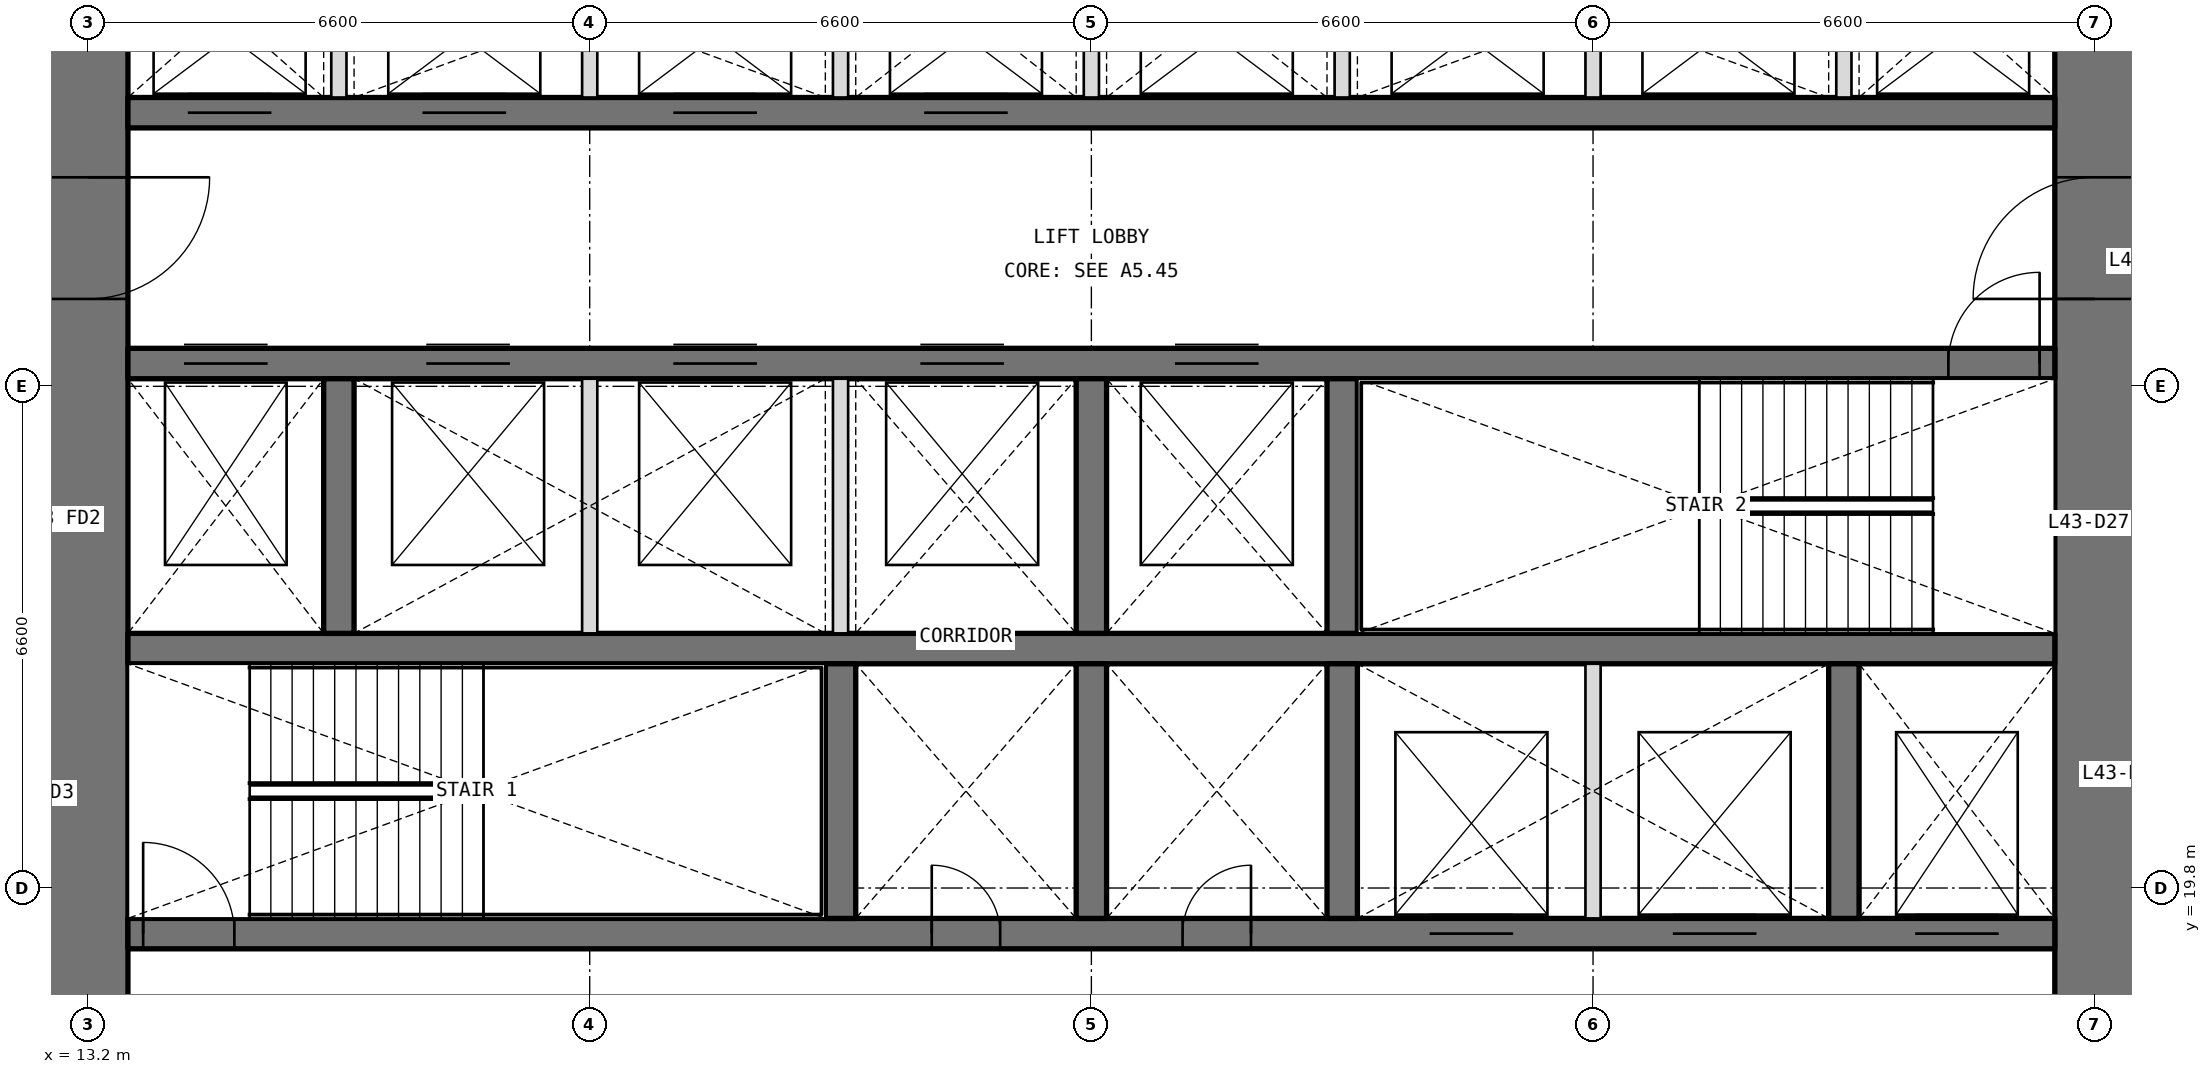
"""IFC4 building model, lengths in metres.
Left out: names, types, materials, properties, quantities, classifications, styles, units other than length and angle.
Written with IfcOpenShell. Run it as: python <this file> out.ifc"""

import sys

from ifc_helpers import new_model, si_unit, direction, frame, frame_2d, origin, place, context, subcontext, project, spatial, rectangle, extrude, element, fill, save


model = new_model("IFC4")
c1 = context("Model", 3, precision=1e-05, world=origin(), true_north=direction((0.0, 1.0)))
c2 = subcontext(c1, "Body", "Model", "MODEL_VIEW")
j1 = project(units=[si_unit("LENGTHUNIT", "METRE"), si_unit("PLANEANGLEUNIT", "RADIAN")], contexts=[c1])
p1 = place(None, origin())
s1 = spatial("IfcSite", under=j1, at=p1, CompositionType="ELEMENT")
p2 = place(p1, origin())
s2 = spatial("IfcBuilding", under=s1, at=p2, CompositionType="ELEMENT")
p3 = place(p2, frame((0.0, 0.0, 189.3)))
s3 = spatial("IfcBuildingStorey", under=s2, at=p3, CompositionType="ELEMENT", Elevation=189.3)
p4 = place(p3, frame((39.6, 13.725, 0.0), z_axis=(0.0, 0.0, 1.0), x_axis=(0.0, 1.0, 0.0)))
e1 = element("IfcWall", 1, at=p4, inside=s3, PredefinedType="SHEAR", context=c2, shape_type="SweptSolid", body=[
    extrude(rectangle(XDim=18.75, YDim=1.05, at=frame_2d((9.375, 0.0))), origin(), (0.0, 0.0, 1.0), 4.2),
])
p5 = place(p4, frame((3.025, 0.0, 0.0)))
e2 = element("IfcOpeningElement", 2, at=p5, cuts=e1, PredefinedType="OPENING", context=c2, shape_type="SweptSolid", body=[
    extrude(rectangle(XDim=1.6, YDim=2.1, at=frame_2d((0.8, 1.05))), frame((0.0, 0.535, 0.0), z_axis=(0.0, -1.0, 0.0), x_axis=(1.0, 0.0, 0.0)), (0.0, 0.0, 1.0), 1.07),
])
p6 = place(p4, frame((13.825, 0.0, 0.0)))
e3 = element("IfcOpeningElement", 3, at=p6, cuts=e1, PredefinedType="OPENING", context=c2, shape_type="SweptSolid", body=[
    extrude(rectangle(XDim=1.6, YDim=2.1, at=frame_2d((0.8, 1.05))), frame((0.0, 0.535, 0.0), z_axis=(0.0, -1.0, 0.0), x_axis=(1.0, 0.0, 0.0)), (0.0, 0.0, 1.0), 1.07),
])
p7 = place(p3, frame((13.2, 32.475, 0.0), z_axis=(0.0, 0.0, 1.0), x_axis=(0.0, -1.0, 0.0)))
e4 = element("IfcWall", 4, at=p7, inside=s3, PredefinedType="SHEAR", context=c2, shape_type="SweptSolid", body=[
    extrude(rectangle(XDim=18.75, YDim=1.05, at=frame_2d((9.375, 0.0))), origin(), (0.0, 0.0, 1.0), 4.2),
])
p8 = place(p7, frame((14.125, 0.0, 0.0)))
e5 = element("IfcOpeningElement", 5, at=p8, cuts=e4, PredefinedType="OPENING", context=c2, shape_type="SweptSolid", body=[
    extrude(rectangle(XDim=1.6, YDim=2.1, at=frame_2d((0.8, 1.05))), frame((0.0, 0.535, 0.0), z_axis=(0.0, -1.0, 0.0), x_axis=(1.0, 0.0, 0.0)), (0.0, 0.0, 1.0), 1.07),
])
p9 = place(p7, frame((3.325, 0.0, 0.0)))
e6 = element("IfcOpeningElement", 6, at=p9, cuts=e4, PredefinedType="OPENING", context=c2, shape_type="SweptSolid", body=[
    extrude(rectangle(XDim=1.6, YDim=2.1, at=frame_2d((0.8, 1.05))), frame((0.0, 0.535, 0.0), z_axis=(0.0, -1.0, 0.0), x_axis=(1.0, 0.0, 0.0)), (0.0, 0.0, 1.0), 1.07),
])
p10 = place(p3, frame((13.725, 19.2, 0.0), z_axis=(0.0, 0.0, 1.0), x_axis=(1.0, 0.0, 0.0)))
e7 = element("IfcWall", 7, at=p10, inside=s3, PredefinedType="SHEAR", context=c2, shape_type="SweptSolid", body=[
    extrude(rectangle(XDim=25.35, YDim=0.4, at=frame_2d((12.675, 0.0))), origin(), (0.0, 0.0, 1.0), 4.2),
])
p11 = place(p10, frame((10.575, 0.0, 0.0)))
e8 = element("IfcOpeningElement", 8, at=p11, cuts=e7, PredefinedType="OPENING", context=c2, shape_type="SweptSolid", body=[
    extrude(rectangle(XDim=0.9, YDim=2.1, at=frame_2d((0.45, 1.05))), frame((0.0, 0.21, 0.0), z_axis=(0.0, -1.0, 0.0), x_axis=(1.0, 0.0, 0.0)), (0.0, 0.0, 1.0), 0.42),
])
p12 = place(p10, frame((13.875, 0.0, 0.0)))
e9 = element("IfcOpeningElement", 9, at=p12, cuts=e7, PredefinedType="OPENING", context=c2, shape_type="SweptSolid", body=[
    extrude(rectangle(XDim=0.9, YDim=2.1, at=frame_2d((0.45, 1.05))), frame((0.0, 0.21, 0.0), z_axis=(0.0, -1.0, 0.0), x_axis=(1.0, 0.0, 0.0)), (0.0, 0.0, 1.0), 0.42),
])
p13 = place(p10, frame((0.2, 0.0, 0.0)))
e10 = element("IfcOpeningElement", 10, at=p13, cuts=e7, PredefinedType="OPENING", context=c2, shape_type="SweptSolid", body=[
    extrude(rectangle(XDim=1.2, YDim=2.1, at=frame_2d((0.6, 1.05))), frame((0.0, 0.21, 0.0), z_axis=(0.0, -1.0, 0.0), x_axis=(1.0, 0.0, 0.0)), (0.0, 0.0, 1.0), 0.42),
])
p14 = place(p10, frame((23.512, 0.0, 0.0)))
e11 = element("IfcOpeningElement", 11, at=p14, cuts=e7, PredefinedType="OPENING", context=c2, shape_type="SweptSolid", body=[
    extrude(rectangle(XDim=1.1, YDim=2.1, at=frame_2d((0.55, 1.05))), frame((0.0, 0.21, 0.0), z_axis=(0.0, -1.0, 0.0), x_axis=(1.0, 0.0, 0.0)), (0.0, 0.0, 1.0), 0.42),
])
p15 = place(p10, frame((17.125, 0.0, 0.0)))
e12 = element("IfcOpeningElement", 12, at=p15, cuts=e7, PredefinedType="OPENING", context=c2, shape_type="SweptSolid", body=[
    extrude(rectangle(XDim=1.1, YDim=2.1, at=frame_2d((0.55, 1.05))), frame((0.0, 0.21, 0.0), z_axis=(0.0, -1.0, 0.0), x_axis=(1.0, 0.0, 0.0)), (0.0, 0.0, 1.0), 0.42),
])
p16 = place(p10, frame((20.325, 0.0, 0.0)))
e13 = element("IfcOpeningElement", 13, at=p16, cuts=e7, PredefinedType="OPENING", context=c2, shape_type="SweptSolid", body=[
    extrude(rectangle(XDim=1.1, YDim=2.1, at=frame_2d((0.55, 1.05))), frame((0.0, 0.21, 0.0), z_axis=(0.0, -1.0, 0.0), x_axis=(1.0, 0.0, 0.0)), (0.0, 0.0, 1.0), 0.42),
])
p17 = place(p3, frame((13.725, 22.95, 0.0), z_axis=(0.0, 0.0, 1.0), x_axis=(1.0, 0.0, 0.0)))
e14 = element("IfcWall", 14, at=p17, inside=s3, PredefinedType="SHEAR", context=c2, shape_type="SweptSolid", body=[
    extrude(rectangle(XDim=25.35, YDim=0.4, at=frame_2d((12.675, 0.0))), origin(), (0.0, 0.0, 1.0), 4.2),
])
p18 = place(p3, frame((13.725, 26.7, 0.0), z_axis=(0.0, 0.0, 1.0), x_axis=(1.0, 0.0, 0.0)))
e15 = element("IfcWall", 15, at=p18, inside=s3, PredefinedType="SHEAR", context=c2, shape_type="SweptSolid", body=[
    extrude(rectangle(XDim=25.35, YDim=0.4, at=frame_2d((12.675, 0.0))), origin(), (0.0, 0.0, 1.0), 4.2),
])
p19 = place(p18, frame((23.95, 0.0, 0.0)))
e16 = element("IfcOpeningElement", 16, at=p19, cuts=e15, PredefinedType="OPENING", context=c2, shape_type="SweptSolid", body=[
    extrude(rectangle(XDim=1.2, YDim=2.1, at=frame_2d((0.6, 1.05))), frame((0.0, 0.21, 0.0), z_axis=(0.0, -1.0, 0.0), x_axis=(1.0, 0.0, 0.0)), (0.0, 0.0, 1.0), 0.42),
])
p20 = place(p18, frame((0.738, 0.0, 0.0)))
e17 = element("IfcOpeningElement", 17, at=p20, cuts=e15, PredefinedType="OPENING", context=c2, shape_type="SweptSolid", body=[
    extrude(rectangle(XDim=1.1, YDim=2.1, at=frame_2d((0.55, 1.05))), frame((0.0, 0.21, 0.0), z_axis=(0.0, -1.0, 0.0), x_axis=(1.0, 0.0, 0.0)), (0.0, 0.0, 1.0), 0.42),
])
p21 = place(p18, frame((3.925, 0.0, 0.0)))
e18 = element("IfcOpeningElement", 18, at=p21, cuts=e15, PredefinedType="OPENING", context=c2, shape_type="SweptSolid", body=[
    extrude(rectangle(XDim=1.1, YDim=2.1, at=frame_2d((0.55, 1.05))), frame((0.0, 0.21, 0.0), z_axis=(0.0, -1.0, 0.0), x_axis=(1.0, 0.0, 0.0)), (0.0, 0.0, 1.0), 0.42),
])
p22 = place(p18, frame((7.175, 0.0, 0.0)))
e19 = element("IfcOpeningElement", 19, at=p22, cuts=e15, PredefinedType="OPENING", context=c2, shape_type="SweptSolid", body=[
    extrude(rectangle(XDim=1.1, YDim=2.1, at=frame_2d((0.55, 1.05))), frame((0.0, 0.21, 0.0), z_axis=(0.0, -1.0, 0.0), x_axis=(1.0, 0.0, 0.0)), (0.0, 0.0, 1.0), 0.42),
])
p23 = place(p18, frame((10.425, 0.0, 0.0)))
e20 = element("IfcOpeningElement", 20, at=p23, cuts=e15, PredefinedType="OPENING", context=c2, shape_type="SweptSolid", body=[
    extrude(rectangle(XDim=1.1, YDim=2.1, at=frame_2d((0.55, 1.05))), frame((0.0, 0.21, 0.0), z_axis=(0.0, -1.0, 0.0), x_axis=(1.0, 0.0, 0.0)), (0.0, 0.0, 1.0), 0.42),
])
p24 = place(p18, frame((13.775, 0.0, 0.0)))
e21 = element("IfcOpeningElement", 21, at=p24, cuts=e15, PredefinedType="OPENING", context=c2, shape_type="SweptSolid", body=[
    extrude(rectangle(XDim=1.1, YDim=2.1, at=frame_2d((0.55, 1.05))), frame((0.0, 0.21, 0.0), z_axis=(0.0, -1.0, 0.0), x_axis=(1.0, 0.0, 0.0)), (0.0, 0.0, 1.0), 0.42),
])
p25 = place(p3, frame((13.725, 30.0, 0.0), z_axis=(0.0, 0.0, 1.0), x_axis=(1.0, 0.0, 0.0)))
e22 = element("IfcWall", 22, at=p25, inside=s3, PredefinedType="SHEAR", context=c2, shape_type="SweptSolid", body=[
    extrude(rectangle(XDim=25.35, YDim=0.4, at=frame_2d((12.675, 0.0))), origin(), (0.0, 0.0, 1.0), 4.2),
])
p26 = place(p25, frame((0.788, 0.0, 0.0)))
e23 = element("IfcOpeningElement", 23, at=p26, cuts=e22, PredefinedType="OPENING", context=c2, shape_type="SweptSolid", body=[
    extrude(rectangle(XDim=1.1, YDim=2.1, at=frame_2d((0.55, 1.05))), frame((0.0, 0.21, 0.0), z_axis=(0.0, -1.0, 0.0), x_axis=(1.0, 0.0, 0.0)), (0.0, 0.0, 1.0), 0.42),
])
p27 = place(p25, frame((3.875, 0.0, 0.0)))
e24 = element("IfcOpeningElement", 24, at=p27, cuts=e22, PredefinedType="OPENING", context=c2, shape_type="SweptSolid", body=[
    extrude(rectangle(XDim=1.1, YDim=2.1, at=frame_2d((0.55, 1.05))), frame((0.0, 0.21, 0.0), z_axis=(0.0, -1.0, 0.0), x_axis=(1.0, 0.0, 0.0)), (0.0, 0.0, 1.0), 0.42),
])
p28 = place(p25, frame((7.175, 0.0, 0.0)))
e25 = element("IfcOpeningElement", 25, at=p28, cuts=e22, PredefinedType="OPENING", context=c2, shape_type="SweptSolid", body=[
    extrude(rectangle(XDim=1.1, YDim=2.1, at=frame_2d((0.55, 1.05))), frame((0.0, 0.21, 0.0), z_axis=(0.0, -1.0, 0.0), x_axis=(1.0, 0.0, 0.0)), (0.0, 0.0, 1.0), 0.42),
])
p29 = place(p25, frame((10.475, 0.0, 0.0)))
e26 = element("IfcOpeningElement", 26, at=p29, cuts=e22, PredefinedType="OPENING", context=c2, shape_type="SweptSolid", body=[
    extrude(rectangle(XDim=1.1, YDim=2.1, at=frame_2d((0.55, 1.05))), frame((0.0, 0.21, 0.0), z_axis=(0.0, -1.0, 0.0), x_axis=(1.0, 0.0, 0.0)), (0.0, 0.0, 1.0), 0.42),
])
for number, where, z_axis, x_axis in (
    (27, (23.1, 19.4, 0.0), (0.0, 0.0, 1.0), (0.0, 1.0, 0.0)),
    (28, (26.4, 19.4, 0.0), (0.0, 0.0, 1.0), (0.0, 1.0, 0.0)),
    (29, (29.7, 19.4, 0.0), (0.0, 0.0, 1.0), (0.0, 1.0, 0.0)),
    (30, (36.3, 19.4, 0.0), (0.0, 0.0, 1.0), (0.0, 1.0, 0.0)),
    (31, (16.5, 23.15, 0.0), (0.0, 0.0, 1.0), (0.0, 1.0, 0.0)),
    (32, (26.4, 23.15, 0.0), (0.0, 0.0, 1.0), (0.0, 1.0, 0.0)),
    (33, (29.7, 23.15, 0.0), (0.0, 0.0, 1.0), (0.0, 1.0, 0.0)),
):
    element("IfcWall", number, at=place(p3, frame(where, z_axis=z_axis, x_axis=x_axis)), inside=s3, PredefinedType="SHEAR", context=c2, shape_type="SweptSolid", body=[
        extrude(rectangle(XDim=3.35, YDim=0.4, at=frame_2d((1.675, 0.0))), origin(), (0.0, 0.0, 1.0), 4.2),
    ])
for number, where, z_axis, x_axis in (
    (34, (16.5, 30.2, 0.0), (0.0, 0.0, 1.0), (0.0, 1.0, 0.0)),
    (35, (19.8, 30.2, 0.0), (0.0, 0.0, 1.0), (0.0, 1.0, 0.0)),
    (36, (23.1, 30.2, 0.0), (0.0, 0.0, 1.0), (0.0, 1.0, 0.0)),
    (37, (26.4, 30.2, 0.0), (0.0, 0.0, 1.0), (0.0, 1.0, 0.0)),
    (38, (29.7, 30.2, 0.0), (0.0, 0.0, 1.0), (0.0, 1.0, 0.0)),
    (39, (33.0, 30.2, 0.0), (0.0, 0.0, 1.0), (0.0, 1.0, 0.0)),
    (40, (36.3, 30.2, 0.0), (0.0, 0.0, 1.0), (0.0, 1.0, 0.0)),
):
    element("IfcWall", number, at=place(p3, frame(where, z_axis=z_axis, x_axis=x_axis)), inside=s3, PredefinedType="PARTITIONING", context=c2, shape_type="SweptSolid", body=[
        extrude(rectangle(XDim=2.275, YDim=0.2, at=frame_2d((1.138, 0.0))), origin(), (0.0, 0.0, 1.0), 4.2),
    ])
for number, where, z_axis, x_axis in (
    (41, (33.0, 19.4, 0.0), (0.0, 0.0, 1.0), (0.0, 1.0, 0.0)),
    (42, (19.8, 23.15, 0.0), (0.0, 0.0, 1.0), (0.0, 1.0, 0.0)),
    (43, (23.1, 23.15, 0.0), (0.0, 0.0, 1.0), (0.0, 1.0, 0.0)),
):
    element("IfcWall", number, at=place(p3, frame(where, z_axis=z_axis, x_axis=x_axis)), inside=s3, PredefinedType="PARTITIONING", context=c2, shape_type="SweptSolid", body=[
        extrude(rectangle(XDim=3.35, YDim=0.2, at=frame_2d((1.675, 0.0))), origin(), (0.0, 0.0, 1.0), 4.2),
    ])
p30 = place(p11, origin())
e44 = element("IfcDoor", 44, at=p30, inside=s3, OperationType="SINGLE_SWING_LEFT", PredefinedType="DOOR", context=c2, shape_type="SweptSolid", body=[
    extrude(rectangle(XDim=0.9, YDim=2.1, at=frame_2d((0.45, 1.05))), frame((0.0, 0.025, 0.0), z_axis=(0.0, -1.0, 0.0), x_axis=(1.0, 0.0, 0.0)), (0.0, 0.0, 1.0), 0.05),
])
fill(e8, e44)
p31 = place(p12, origin())
e45 = element("IfcDoor", 45, at=p31, inside=s3, OperationType="SINGLE_SWING_RIGHT", PredefinedType="DOOR", context=c2, shape_type="SweptSolid", body=[
    extrude(rectangle(XDim=0.9, YDim=2.1, at=frame_2d((0.45, 1.05))), frame((0.0, 0.025, 0.0), z_axis=(0.0, -1.0, 0.0), x_axis=(1.0, 0.0, 0.0)), (0.0, 0.0, 1.0), 0.05),
])
fill(e9, e45)
p32 = place(p13, origin())
e46 = element("IfcDoor", 46, at=p32, inside=s3, OperationType="SINGLE_SWING_LEFT", PredefinedType="DOOR", context=c2, shape_type="SweptSolid", body=[
    extrude(rectangle(XDim=1.2, YDim=2.1, at=frame_2d((0.6, 1.05))), frame((0.0, 0.025, 0.0), z_axis=(0.0, -1.0, 0.0), x_axis=(1.0, 0.0, 0.0)), (0.0, 0.0, 1.0), 0.05),
])
fill(e10, e46)
p33 = place(p19, origin())
e47 = element("IfcDoor", 47, at=p33, inside=s3, OperationType="SINGLE_SWING_RIGHT", PredefinedType="DOOR", context=c2, shape_type="SweptSolid", body=[
    extrude(rectangle(XDim=1.2, YDim=2.1, at=frame_2d((0.6, 1.05))), frame((0.0, 0.025, 0.0), z_axis=(0.0, -1.0, 0.0), x_axis=(1.0, 0.0, 0.0)), (0.0, 0.0, 1.0), 0.05),
])
fill(e16, e47)
p34 = place(p9, origin())
e48 = element("IfcDoor", 48, at=p34, inside=s3, OperationType="DOUBLE_DOOR_DOUBLE_SWING", PredefinedType="DOOR", context=c2, shape_type="SweptSolid", body=[
    extrude(rectangle(XDim=1.6, YDim=2.1, at=frame_2d((0.8, 1.05))), frame((0.0, 0.025, 0.0), z_axis=(0.0, -1.0, 0.0), x_axis=(1.0, 0.0, 0.0)), (0.0, 0.0, 1.0), 0.05),
])
fill(e6, e48)
p35 = place(p6, origin())
e49 = element("IfcDoor", 49, at=p35, inside=s3, OperationType="DOUBLE_DOOR_DOUBLE_SWING", PredefinedType="DOOR", context=c2, shape_type="SweptSolid", body=[
    extrude(rectangle(XDim=1.6, YDim=2.1, at=frame_2d((0.8, 1.05))), frame((0.0, 0.025, 0.0), z_axis=(0.0, -1.0, 0.0), x_axis=(1.0, 0.0, 0.0)), (0.0, 0.0, 1.0), 0.05),
])
fill(e3, e49)
p36 = place(p26, origin())
e50 = element("IfcDoor", 50, at=p36, inside=s3, OperationType="DOUBLE_DOOR_SLIDING", PredefinedType="DOOR", context=c2, shape_type="SweptSolid", body=[
    extrude(rectangle(XDim=1.1, YDim=2.1, at=frame_2d((0.55, 1.05))), frame((0.0, 0.025, 0.0), z_axis=(0.0, -1.0, 0.0), x_axis=(1.0, 0.0, 0.0)), (0.0, 0.0, 1.0), 0.05),
])
fill(e23, e50)
p37 = place(p27, origin())
e51 = element("IfcDoor", 51, at=p37, inside=s3, OperationType="DOUBLE_DOOR_SLIDING", PredefinedType="DOOR", context=c2, shape_type="SweptSolid", body=[
    extrude(rectangle(XDim=1.1, YDim=2.1, at=frame_2d((0.55, 1.05))), frame((0.0, 0.025, 0.0), z_axis=(0.0, -1.0, 0.0), x_axis=(1.0, 0.0, 0.0)), (0.0, 0.0, 1.0), 0.05),
])
fill(e24, e51)
p38 = place(p28, origin())
e52 = element("IfcDoor", 52, at=p38, inside=s3, OperationType="DOUBLE_DOOR_SLIDING", PredefinedType="DOOR", context=c2, shape_type="SweptSolid", body=[
    extrude(rectangle(XDim=1.1, YDim=2.1, at=frame_2d((0.55, 1.05))), frame((0.0, 0.025, 0.0), z_axis=(0.0, -1.0, 0.0), x_axis=(1.0, 0.0, 0.0)), (0.0, 0.0, 1.0), 0.05),
])
fill(e25, e52)
p39 = place(p29, origin())
e53 = element("IfcDoor", 53, at=p39, inside=s3, OperationType="DOUBLE_DOOR_SLIDING", PredefinedType="DOOR", context=c2, shape_type="SweptSolid", body=[
    extrude(rectangle(XDim=1.1, YDim=2.1, at=frame_2d((0.55, 1.05))), frame((0.0, 0.025, 0.0), z_axis=(0.0, -1.0, 0.0), x_axis=(1.0, 0.0, 0.0)), (0.0, 0.0, 1.0), 0.05),
])
fill(e26, e53)
p40 = place(p20, origin())
e54 = element("IfcDoor", 54, at=p40, inside=s3, OperationType="DOUBLE_DOOR_SLIDING", PredefinedType="DOOR", context=c2, shape_type="SweptSolid", body=[
    extrude(rectangle(XDim=1.1, YDim=2.1, at=frame_2d((0.55, 1.05))), frame((0.0, 0.025, 0.0), z_axis=(0.0, -1.0, 0.0), x_axis=(1.0, 0.0, 0.0)), (0.0, 0.0, 1.0), 0.05),
])
fill(e17, e54)
p41 = place(p14, origin())
e55 = element("IfcDoor", 55, at=p41, inside=s3, OperationType="DOUBLE_DOOR_SLIDING", PredefinedType="DOOR", context=c2, shape_type="SweptSolid", body=[
    extrude(rectangle(XDim=1.1, YDim=2.1, at=frame_2d((0.55, 1.05))), frame((0.0, 0.025, 0.0), z_axis=(0.0, -1.0, 0.0), x_axis=(1.0, 0.0, 0.0)), (0.0, 0.0, 1.0), 0.05),
])
fill(e11, e55)
p42 = place(p15, origin())
e56 = element("IfcDoor", 56, at=p42, inside=s3, OperationType="DOUBLE_DOOR_SLIDING", PredefinedType="DOOR", context=c2, shape_type="SweptSolid", body=[
    extrude(rectangle(XDim=1.1, YDim=2.1, at=frame_2d((0.55, 1.05))), frame((0.0, 0.025, 0.0), z_axis=(0.0, -1.0, 0.0), x_axis=(1.0, 0.0, 0.0)), (0.0, 0.0, 1.0), 0.05),
])
fill(e12, e56)
p43 = place(p16, origin())
e57 = element("IfcDoor", 57, at=p43, inside=s3, OperationType="DOUBLE_DOOR_SLIDING", PredefinedType="DOOR", context=c2, shape_type="SweptSolid", body=[
    extrude(rectangle(XDim=1.1, YDim=2.1, at=frame_2d((0.55, 1.05))), frame((0.0, 0.025, 0.0), z_axis=(0.0, -1.0, 0.0), x_axis=(1.0, 0.0, 0.0)), (0.0, 0.0, 1.0), 0.05),
])
fill(e13, e57)
p44 = place(p21, origin())
e58 = element("IfcDoor", 58, at=p44, inside=s3, OperationType="DOUBLE_DOOR_SLIDING", PredefinedType="DOOR", context=c2, shape_type="SweptSolid", body=[
    extrude(rectangle(XDim=1.1, YDim=2.1, at=frame_2d((0.55, 1.05))), frame((0.0, 0.025, 0.0), z_axis=(0.0, -1.0, 0.0), x_axis=(1.0, 0.0, 0.0)), (0.0, 0.0, 1.0), 0.05),
])
fill(e18, e58)
p45 = place(p22, origin())
e59 = element("IfcDoor", 59, at=p45, inside=s3, OperationType="DOUBLE_DOOR_SLIDING", PredefinedType="DOOR", context=c2, shape_type="SweptSolid", body=[
    extrude(rectangle(XDim=1.1, YDim=2.1, at=frame_2d((0.55, 1.05))), frame((0.0, 0.025, 0.0), z_axis=(0.0, -1.0, 0.0), x_axis=(1.0, 0.0, 0.0)), (0.0, 0.0, 1.0), 0.05),
])
fill(e19, e59)
p46 = place(p23, origin())
e60 = element("IfcDoor", 60, at=p46, inside=s3, OperationType="DOUBLE_DOOR_SLIDING", PredefinedType="DOOR", context=c2, shape_type="SweptSolid", body=[
    extrude(rectangle(XDim=1.1, YDim=2.1, at=frame_2d((0.55, 1.05))), frame((0.0, 0.025, 0.0), z_axis=(0.0, -1.0, 0.0), x_axis=(1.0, 0.0, 0.0)), (0.0, 0.0, 1.0), 0.05),
])
fill(e20, e60)
p47 = place(p24, origin())
e61 = element("IfcDoor", 61, at=p47, inside=s3, OperationType="DOUBLE_DOOR_SLIDING", PredefinedType="DOOR", context=c2, shape_type="SweptSolid", body=[
    extrude(rectangle(XDim=1.1, YDim=2.1, at=frame_2d((0.55, 1.05))), frame((0.0, 0.025, 0.0), z_axis=(0.0, -1.0, 0.0), x_axis=(1.0, 0.0, 0.0)), (0.0, 0.0, 1.0), 0.05),
])
fill(e21, e61)
save(model, sys.argv[1])
